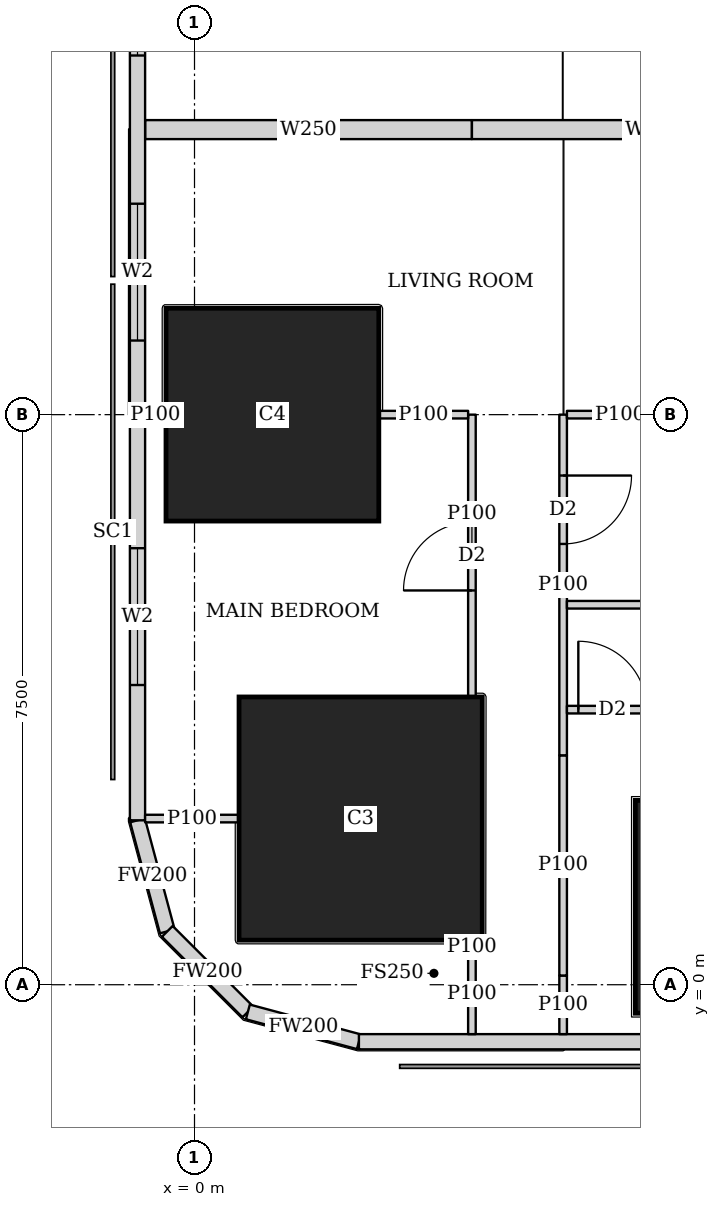
"""IFC4 building model, lengths in metres.
Left out: names, types, materials, properties, quantities, classifications, styles, units other than length and angle.
Written with IfcOpenShell. Run it as: python <this file> out.ifc"""

import sys

from ifc_helpers import new_model, si_unit, direction, frame, frame_2d, origin, origin_2d, place, context, subcontext, project, spatial, rectangle, extrude, element, fill, save


model = new_model("IFC4")
c1 = context("Model", 3, precision=1e-05, world=origin(), true_north=direction((0.0, 1.0)))
c2 = subcontext(c1, "Body", "Model", "MODEL_VIEW")
j1 = project(units=[si_unit("LENGTHUNIT", "METRE"), si_unit("PLANEANGLEUNIT", "RADIAN")], contexts=[c1])
p1 = place(None, origin())
s1 = spatial("IfcSite", under=j1, at=p1, CompositionType="ELEMENT")
p2 = place(p1, origin())
s2 = spatial("IfcBuilding", under=s1, at=p2, CompositionType="ELEMENT")
p3 = place(p2, frame((0.0, 0.0, 65.0)))
s3 = spatial("IfcBuildingStorey", under=s2, at=p3, CompositionType="ELEMENT", Elevation=65.0)
p4 = place(p3, frame((7.2, 1.025, 0.0), z_axis=(0.0, 0.0, 1.0), x_axis=(1.0, 0.0, 0.0)))
e1 = element("IfcColumn", 1, at=p4, inside=s3, PredefinedType="COLUMN", context=c2, shape_type="SweptSolid", body=[
    extrude(rectangle(XDim=2.8, YDim=2.8, at=origin_2d()), origin(), (0.0, 0.0, 1.0), 3.75),
])
p5 = place(p3, frame((2.186, 2.186, 0.0), z_axis=(0.0, 0.0, 1.0), x_axis=(1.0, 0.0, 0.0)))
e2 = element("IfcColumn", 2, at=p5, inside=s3, PredefinedType="COLUMN", context=c2, shape_type="SweptSolid", body=[
    extrude(rectangle(XDim=3.2, YDim=3.2, at=origin_2d()), origin(), (0.0, 0.0, 1.0), 3.75),
])
p6 = place(p3, frame((1.025, 7.5, 0.0), z_axis=(0.0, 0.0, 1.0), x_axis=(1.0, 0.0, 0.0)))
e3 = element("IfcColumn", 3, at=p6, inside=s3, PredefinedType="COLUMN", context=c2, shape_type="SweptSolid", body=[
    extrude(rectangle(XDim=2.8, YDim=2.8, at=origin_2d()), origin(), (0.0, 0.0, 1.0), 3.75),
])
p7 = place(p3, frame((2.163, -0.75, 0.0), z_axis=(0.0, 0.0, 1.0), x_axis=(1.0, 0.0, 0.0)))
e4 = element("IfcWall", 4, at=p7, inside=s3, PredefinedType="SOLIDWALL", context=c2, shape_type="SweptSolid", body=[
    extrude(rectangle(XDim=45.628, YDim=0.2, at=frame_2d((22.814, 0.0))), origin(), (0.0, 0.0, 1.0), 3.5),
])
p8 = place(p7, frame((9.537, 0.0, 0.9)))
e5 = element("IfcOpeningElement", 5, at=p8, cuts=e4, PredefinedType="OPENING", context=c2, shape_type="SweptSolid", body=[
    extrude(rectangle(XDim=1.8, YDim=1.5, at=frame_2d((0.9, 0.75))), frame((0.0, 0.11, 0.0), z_axis=(0.0, -1.0, 0.0), x_axis=(1.0, 0.0, 0.0)), (0.0, 0.0, 1.0), 0.22),
])
p9 = place(p7, frame((13.137, 0.0, 0.9)))
e6 = element("IfcOpeningElement", 6, at=p9, cuts=e4, PredefinedType="OPENING", context=c2, shape_type="SweptSolid", body=[
    extrude(rectangle(XDim=1.8, YDim=1.5, at=frame_2d((0.9, 0.75))), frame((0.0, 0.11, 0.0), z_axis=(0.0, -1.0, 0.0), x_axis=(1.0, 0.0, 0.0)), (0.0, 0.0, 1.0), 0.22),
])
p10 = place(p7, frame((16.737, 0.0, 0.9)))
e7 = element("IfcOpeningElement", 7, at=p10, cuts=e4, PredefinedType="OPENING", context=c2, shape_type="SweptSolid", body=[
    extrude(rectangle(XDim=1.8, YDim=1.5, at=frame_2d((0.9, 0.75))), frame((0.0, 0.11, 0.0), z_axis=(0.0, -1.0, 0.0), x_axis=(1.0, 0.0, 0.0)), (0.0, 0.0, 1.0), 0.22),
])
p11 = place(p7, frame((20.337, 0.0, 0.9)))
e8 = element("IfcOpeningElement", 8, at=p11, cuts=e4, PredefinedType="OPENING", context=c2, shape_type="SweptSolid", body=[
    extrude(rectangle(XDim=1.8, YDim=1.5, at=frame_2d((0.9, 0.75))), frame((0.0, 0.11, 0.0), z_axis=(0.0, -1.0, 0.0), x_axis=(1.0, 0.0, 0.0)), (0.0, 0.0, 1.0), 0.22),
])
p12 = place(p7, frame((23.937, 0.0, 0.9)))
e9 = element("IfcOpeningElement", 9, at=p12, cuts=e4, PredefinedType="OPENING", context=c2, shape_type="SweptSolid", body=[
    extrude(rectangle(XDim=1.8, YDim=1.5, at=frame_2d((0.9, 0.75))), frame((0.0, 0.11, 0.0), z_axis=(0.0, -1.0, 0.0), x_axis=(1.0, 0.0, 0.0)), (0.0, 0.0, 1.0), 0.22),
])
p13 = place(p7, frame((27.537, 0.0, 0.9)))
e10 = element("IfcOpeningElement", 10, at=p13, cuts=e4, PredefinedType="OPENING", context=c2, shape_type="SweptSolid", body=[
    extrude(rectangle(XDim=1.8, YDim=1.5, at=frame_2d((0.9, 0.75))), frame((0.0, 0.11, 0.0), z_axis=(0.0, -1.0, 0.0), x_axis=(1.0, 0.0, 0.0)), (0.0, 0.0, 1.0), 0.22),
])
p14 = place(p7, frame((31.137, 0.0, 0.9)))
e11 = element("IfcOpeningElement", 11, at=p14, cuts=e4, PredefinedType="OPENING", context=c2, shape_type="SweptSolid", body=[
    extrude(rectangle(XDim=1.8, YDim=1.5, at=frame_2d((0.9, 0.75))), frame((0.0, 0.11, 0.0), z_axis=(0.0, -1.0, 0.0), x_axis=(1.0, 0.0, 0.0)), (0.0, 0.0, 1.0), 0.22),
])
p15 = place(p7, frame((34.737, 0.0, 0.9)))
e12 = element("IfcOpeningElement", 12, at=p15, cuts=e4, PredefinedType="OPENING", context=c2, shape_type="SweptSolid", body=[
    extrude(rectangle(XDim=1.8, YDim=1.5, at=frame_2d((0.9, 0.75))), frame((0.0, 0.11, 0.0), z_axis=(0.0, -1.0, 0.0), x_axis=(1.0, 0.0, 0.0)), (0.0, 0.0, 1.0), 0.22),
])
p16 = place(p3, frame((-0.75, 42.837, 0.0), z_axis=(0.0, 0.0, 1.0), x_axis=(0.0, -1.0, 0.0)))
e13 = element("IfcWall", 13, at=p16, inside=s3, PredefinedType="SOLIDWALL", context=c2, shape_type="SweptSolid", body=[
    extrude(rectangle(XDim=40.674, YDim=0.2, at=frame_2d((20.337, 0.0))), origin(), (0.0, 0.0, 1.0), 3.5),
])
p17 = place(p16, frame((1.78, 0.0, 0.9)))
e14 = element("IfcOpeningElement", 14, at=p17, cuts=e13, PredefinedType="OPENING", context=c2, shape_type="SweptSolid", body=[
    extrude(rectangle(XDim=1.8, YDim=1.5, at=frame_2d((0.9, 0.75))), frame((0.0, 0.11, 0.0), z_axis=(0.0, -1.0, 0.0), x_axis=(1.0, 0.0, 0.0)), (0.0, 0.0, 1.0), 0.22),
])
p18 = place(p16, frame((6.312, 0.0, 0.9)))
e15 = element("IfcOpeningElement", 15, at=p18, cuts=e13, PredefinedType="OPENING", context=c2, shape_type="SweptSolid", body=[
    extrude(rectangle(XDim=1.8, YDim=1.5, at=frame_2d((0.9, 0.75))), frame((0.0, 0.11, 0.0), z_axis=(0.0, -1.0, 0.0), x_axis=(1.0, 0.0, 0.0)), (0.0, 0.0, 1.0), 0.22),
])
p19 = place(p16, frame((10.062, 0.0, 0.9)))
e16 = element("IfcOpeningElement", 16, at=p19, cuts=e13, PredefinedType="OPENING", context=c2, shape_type="SweptSolid", body=[
    extrude(rectangle(XDim=1.8, YDim=1.5, at=frame_2d((0.9, 0.75))), frame((0.0, 0.11, 0.0), z_axis=(0.0, -1.0, 0.0), x_axis=(1.0, 0.0, 0.0)), (0.0, 0.0, 1.0), 0.22),
])
p20 = place(p16, frame((13.812, 0.0, 0.9)))
e17 = element("IfcOpeningElement", 17, at=p20, cuts=e13, PredefinedType="OPENING", context=c2, shape_type="SweptSolid", body=[
    extrude(rectangle(XDim=1.8, YDim=1.5, at=frame_2d((0.9, 0.75))), frame((0.0, 0.11, 0.0), z_axis=(0.0, -1.0, 0.0), x_axis=(1.0, 0.0, 0.0)), (0.0, 0.0, 1.0), 0.22),
])
p21 = place(p16, frame((17.562, 0.0, 0.9)))
e18 = element("IfcOpeningElement", 18, at=p21, cuts=e13, PredefinedType="OPENING", context=c2, shape_type="SweptSolid", body=[
    extrude(rectangle(XDim=1.8, YDim=1.5, at=frame_2d((0.9, 0.75))), frame((0.0, 0.11, 0.0), z_axis=(0.0, -1.0, 0.0), x_axis=(1.0, 0.0, 0.0)), (0.0, 0.0, 1.0), 0.22),
])
p22 = place(p16, frame((21.312, 0.0, 0.9)))
e19 = element("IfcOpeningElement", 19, at=p22, cuts=e13, PredefinedType="OPENING", context=c2, shape_type="SweptSolid", body=[
    extrude(rectangle(XDim=1.8, YDim=1.5, at=frame_2d((0.9, 0.75))), frame((0.0, 0.11, 0.0), z_axis=(0.0, -1.0, 0.0), x_axis=(1.0, 0.0, 0.0)), (0.0, 0.0, 1.0), 0.22),
])
p23 = place(p16, frame((25.062, 0.0, 0.9)))
e20 = element("IfcOpeningElement", 20, at=p23, cuts=e13, PredefinedType="OPENING", context=c2, shape_type="SweptSolid", body=[
    extrude(rectangle(XDim=1.8, YDim=1.5, at=frame_2d((0.9, 0.75))), frame((0.0, 0.11, 0.0), z_axis=(0.0, -1.0, 0.0), x_axis=(1.0, 0.0, 0.0)), (0.0, 0.0, 1.0), 0.22),
])
p24 = place(p16, frame((28.812, 0.0, 0.9)))
e21 = element("IfcOpeningElement", 21, at=p24, cuts=e13, PredefinedType="OPENING", context=c2, shape_type="SweptSolid", body=[
    extrude(rectangle(XDim=1.8, YDim=1.5, at=frame_2d((0.9, 0.75))), frame((0.0, 0.11, 0.0), z_axis=(0.0, -1.0, 0.0), x_axis=(1.0, 0.0, 0.0)), (0.0, 0.0, 1.0), 0.22),
])
p25 = place(p16, frame((32.562, 0.0, 0.9)))
e22 = element("IfcOpeningElement", 22, at=p25, cuts=e13, PredefinedType="OPENING", context=c2, shape_type="SweptSolid", body=[
    extrude(rectangle(XDim=1.8, YDim=1.5, at=frame_2d((0.9, 0.75))), frame((0.0, 0.11, 0.0), z_axis=(0.0, -1.0, 0.0), x_axis=(1.0, 0.0, 0.0)), (0.0, 0.0, 1.0), 0.22),
])
p26 = place(p16, frame((37.094, 0.0, 0.9)))
e23 = element("IfcOpeningElement", 23, at=p26, cuts=e13, PredefinedType="OPENING", context=c2, shape_type="SweptSolid", body=[
    extrude(rectangle(XDim=1.8, YDim=1.5, at=frame_2d((0.9, 0.75))), frame((0.0, 0.11, 0.0), z_axis=(0.0, -1.0, 0.0), x_axis=(1.0, 0.0, 0.0)), (0.0, 0.0, 1.0), 0.22),
])
p27 = place(p3, frame((-0.75, 2.163, 0.0), z_axis=(0.0, 0.0, 1.0), x_axis=(0.259168954497, -0.965832000415, 0.0)))
e24 = element("IfcWall", 24, at=p27, inside=s3, PredefinedType="SOLIDWALL", context=c2, shape_type="SweptSolid", body=[
    extrude(rectangle(XDim=1.513, YDim=0.2, at=frame_2d((0.756, 0.0))), origin(), (0.0, 0.0, 1.0), 3.5),
])
p28 = place(p3, frame((-0.358, 0.702, 0.0), z_axis=(0.0, 0.0, 1.0), x_axis=(0.707106781187, -0.707106781187, 0.0)))
e25 = element("IfcWall", 25, at=p28, inside=s3, PredefinedType="SOLIDWALL", context=c2, shape_type="SweptSolid", body=[
    extrude(rectangle(XDim=1.499, YDim=0.2, at=frame_2d((0.75, 0.0))), origin(), (0.0, 0.0, 1.0), 3.5),
])
p29 = place(p3, frame((0.702, -0.358, 0.0), z_axis=(0.0, 0.0, 1.0), x_axis=(0.965832000415, -0.259168954497, 0.0)))
e26 = element("IfcWall", 26, at=p29, inside=s3, PredefinedType="SOLIDWALL", context=c2, shape_type="SweptSolid", body=[
    extrude(rectangle(XDim=1.513, YDim=0.2, at=frame_2d((0.756, 0.0))), origin(), (0.0, 0.0, 1.0), 3.5),
])
p30 = place(p3, frame((3.65, -0.65, 0.0), z_axis=(0.0, 0.0, 1.0), x_axis=(0.0, 1.0, 0.0)))
e27 = element("IfcWall", 27, at=p30, inside=s3, PredefinedType="PARTITIONING", context=c2, shape_type="SweptSolid", body=[
    extrude(rectangle(XDim=1.048, YDim=0.1, at=frame_2d((0.524, 0.0))), origin(), (0.0, 0.0, 1.0), 3.5),
])
p31 = place(p3, frame((3.65, 0.398, 0.0), z_axis=(0.0, 0.0, 1.0), x_axis=(0.0, 1.0, 0.0)))
e28 = element("IfcWall", 28, at=p31, inside=s3, PredefinedType="PARTITIONING", context=c2, shape_type="SweptSolid", body=[
    extrude(rectangle(XDim=0.187, YDim=0.1, at=frame_2d((0.094, 0.0))), origin(), (0.0, 0.0, 1.0), 2.05),
])
p32 = place(p3, frame((3.65, 3.787, 0.0), z_axis=(0.0, 0.0, 1.0), x_axis=(0.0, 1.0, 0.0)))
e29 = element("IfcWall", 29, at=p32, inside=s3, PredefinedType="PARTITIONING", context=c2, shape_type="SweptSolid", body=[
    extrude(rectangle(XDim=3.713, YDim=0.1, at=frame_2d((1.856, 0.0))), origin(), (0.0, 0.0, 1.0), 3.5),
])
p33 = place(p32, frame((1.4, 0.0, 0.0)))
e30 = element("IfcOpeningElement", 30, at=p33, cuts=e29, PredefinedType="OPENING", context=c2, shape_type="SweptSolid", body=[
    extrude(rectangle(XDim=0.9, YDim=2.1, at=frame_2d((0.45, 1.05))), frame((0.0, 0.06, 0.0), z_axis=(0.0, -1.0, 0.0), x_axis=(1.0, 0.0, 0.0)), (0.0, 0.0, 1.0), 0.12),
])
p34 = place(p3, frame((4.85, -0.65, 0.0), z_axis=(0.0, 0.0, 1.0), x_axis=(0.0, 1.0, 0.0)))
e31 = element("IfcWall", 31, at=p34, inside=s3, PredefinedType="PARTITIONING", context=c2, shape_type="SweptSolid", body=[
    extrude(rectangle(XDim=0.771, YDim=0.1, at=frame_2d((0.385, 0.0))), origin(), (0.0, 0.0, 1.0), 3.5),
])
p35 = place(p3, frame((4.85, 0.121, 0.0), z_axis=(0.0, 0.0, 1.0), x_axis=(0.0, 1.0, 0.0)))
e32 = element("IfcWall", 32, at=p35, inside=s3, PredefinedType="PARTITIONING", context=c2, shape_type="SweptSolid", body=[
    extrude(rectangle(XDim=2.897, YDim=0.1, at=frame_2d((1.448, 0.0))), origin(), (0.0, 0.0, 1.0), 2.05),
])
p36 = place(p3, frame((4.85, 3.018, 0.0), z_axis=(0.0, 0.0, 1.0), x_axis=(0.0, 1.0, 0.0)))
e33 = element("IfcWall", 33, at=p36, inside=s3, PredefinedType="PARTITIONING", context=c2, shape_type="SweptSolid", body=[
    extrude(rectangle(XDim=4.482, YDim=0.1, at=frame_2d((2.241, 0.0))), origin(), (0.0, 0.0, 1.0), 3.5),
])
p37 = place(p36, frame((2.781, 0.0, 0.0)))
e34 = element("IfcOpeningElement", 34, at=p37, cuts=e33, PredefinedType="OPENING", context=c2, shape_type="SweptSolid", body=[
    extrude(rectangle(XDim=0.9, YDim=2.1, at=frame_2d((0.45, 1.05))), frame((0.0, 0.06, 0.0), z_axis=(0.0, -1.0, 0.0), x_axis=(1.0, 0.0, 0.0)), (0.0, 0.0, 1.0), 0.12),
])
p38 = place(p3, frame((-0.65, 2.186, 0.0), z_axis=(0.0, 0.0, 1.0), x_axis=(1.0, 0.0, 0.0)))
e35 = element("IfcWall", 35, at=p38, inside=s3, PredefinedType="PARTITIONING", context=c2, shape_type="SweptSolid", body=[
    extrude(rectangle(XDim=1.235, YDim=0.1, at=frame_2d((0.617, 0.0))), origin(), (0.0, 0.0, 1.0), 3.5),
])
p39 = place(p3, frame((-0.65, 7.5, 0.0), z_axis=(0.0, 0.0, 1.0), x_axis=(1.0, 0.0, 0.0)))
e36 = element("IfcWall", 36, at=p39, inside=s3, PredefinedType="PARTITIONING", context=c2, shape_type="SweptSolid", body=[
    extrude(rectangle(XDim=0.274, YDim=0.1, at=frame_2d((0.137, 0.0))), origin(), (0.0, 0.0, 1.0), 3.5),
])
p40 = place(p3, frame((2.426, 7.5, 0.0), z_axis=(0.0, 0.0, 1.0), x_axis=(1.0, 0.0, 0.0)))
e37 = element("IfcWall", 37, at=p40, inside=s3, PredefinedType="PARTITIONING", context=c2, shape_type="SweptSolid", body=[
    extrude(rectangle(XDim=1.174, YDim=0.1, at=frame_2d((0.587, 0.0))), origin(), (0.0, 0.0, 1.0), 2.05),
])
p41 = place(p3, frame((4.9, 4.999, 0.0), z_axis=(0.0, 0.0, 1.0), x_axis=(1.0, 0.0, 0.0)))
e38 = element("IfcWall", 38, at=p41, inside=s3, PredefinedType="PARTITIONING", context=c2, shape_type="SweptSolid", body=[
    extrude(rectangle(XDim=3.525, YDim=0.1, at=frame_2d((1.763, 0.0))), origin(), (0.0, 0.0, 1.0), 3.5),
])
p42 = place(p41, frame((1.325, 0.0, 0.0)))
e39 = element("IfcOpeningElement", 39, at=p42, cuts=e38, PredefinedType="OPENING", context=c2, shape_type="SweptSolid", body=[
    extrude(rectangle(XDim=0.9, YDim=2.1, at=frame_2d((0.45, 1.05))), frame((0.0, 0.06, 0.0), z_axis=(0.0, -1.0, 0.0), x_axis=(1.0, 0.0, 0.0)), (0.0, 0.0, 1.0), 0.12),
])
p43 = place(p3, frame((4.9, 7.5, 0.0), z_axis=(0.0, 0.0, 1.0), x_axis=(1.0, 0.0, 0.0)))
e40 = element("IfcWall", 40, at=p43, inside=s3, PredefinedType="PARTITIONING", context=c2, shape_type="SweptSolid", body=[
    extrude(rectangle(XDim=1.399, YDim=0.1, at=frame_2d((0.7, 0.0))), origin(), (0.0, 0.0, 1.0), 3.5),
])
p44 = place(p3, frame((-0.65, 11.25, 0.0), z_axis=(0.0, 0.0, 1.0), x_axis=(1.0, 0.0, 0.0)))
e41 = element("IfcWall", 41, at=p44, inside=s3, PredefinedType="SOLIDWALL", context=c2, shape_type="SweptSolid", body=[
    extrude(rectangle(XDim=4.3, YDim=0.25, at=frame_2d((2.15, 0.0))), origin(), (0.0, 0.0, 1.0), 2.05),
])
p45 = place(p3, frame((3.65, 11.25, 0.0), z_axis=(0.0, 0.0, 1.0), x_axis=(1.0, 0.0, 0.0)))
e42 = element("IfcWall", 42, at=p45, inside=s3, PredefinedType="SOLIDWALL", context=c2, shape_type="SweptSolid", body=[
    extrude(rectangle(XDim=4.775, YDim=0.25, at=frame_2d((2.388, 0.0))), origin(), (0.0, 0.0, 1.0), 3.5),
])
p46 = place(p3, frame((4.9, 3.619, 0.0), z_axis=(0.0, 0.0, 1.0), x_axis=(1.0, 0.0, 0.0)))
e43 = element("IfcWall", 43, at=p46, inside=s3, PredefinedType="PARTITIONING", context=c2, shape_type="SweptSolid", body=[
    extrude(rectangle(XDim=3.525, YDim=0.1, at=frame_2d((1.763, 0.0))), origin(), (0.0, 0.0, 1.0), 3.5),
])
p47 = place(p46, frame((0.15, 0.0, 0.0)))
e44 = element("IfcOpeningElement", 44, at=p47, cuts=e43, PredefinedType="OPENING", context=c2, shape_type="SweptSolid", body=[
    extrude(rectangle(XDim=0.9, YDim=2.1, at=frame_2d((0.45, 1.05))), frame((0.0, 0.06, 0.0), z_axis=(0.0, -1.0, 0.0), x_axis=(1.0, 0.0, 0.0)), (0.0, 0.0, 1.0), 0.12),
])
p48 = place(p24, origin())
e45 = element("IfcWindow", 45, at=p48, inside=s3, PartitioningType="SINGLE_PANEL", PredefinedType="WINDOW", context=c2, shape_type="SweptSolid", body=[
    extrude(rectangle(XDim=1.8, YDim=1.5, at=frame_2d((0.9, 0.75))), frame((0.0, 0.03, 0.0), z_axis=(0.0, -1.0, 0.0), x_axis=(1.0, 0.0, 0.0)), (0.0, 0.0, 1.0), 0.06),
])
fill(e21, e45)
p49 = place(p25, origin())
e46 = element("IfcWindow", 46, at=p49, inside=s3, PartitioningType="SINGLE_PANEL", PredefinedType="WINDOW", context=c2, shape_type="SweptSolid", body=[
    extrude(rectangle(XDim=1.8, YDim=1.5, at=frame_2d((0.9, 0.75))), frame((0.0, 0.03, 0.0), z_axis=(0.0, -1.0, 0.0), x_axis=(1.0, 0.0, 0.0)), (0.0, 0.0, 1.0), 0.06),
])
fill(e22, e46)
p50 = place(p26, origin())
e47 = element("IfcWindow", 47, at=p50, inside=s3, PartitioningType="SINGLE_PANEL", PredefinedType="WINDOW", context=c2, shape_type="SweptSolid", body=[
    extrude(rectangle(XDim=1.8, YDim=1.5, at=frame_2d((0.9, 0.75))), frame((0.0, 0.03, 0.0), z_axis=(0.0, -1.0, 0.0), x_axis=(1.0, 0.0, 0.0)), (0.0, 0.0, 1.0), 0.06),
])
fill(e23, e47)
p51 = place(p33, origin())
e48 = element("IfcDoor", 48, at=p51, inside=s3, OperationType="SINGLE_SWING_LEFT", PredefinedType="DOOR", context=c2, shape_type="SweptSolid", body=[
    extrude(rectangle(XDim=0.9, YDim=2.1, at=frame_2d((0.45, 1.05))), frame((0.0, 0.025, 0.0), z_axis=(0.0, -1.0, 0.0), x_axis=(1.0, 0.0, 0.0)), (0.0, 0.0, 1.0), 0.05),
])
fill(e30, e48)
p52 = place(p37, origin())
e49 = element("IfcDoor", 49, at=p52, inside=s3, OperationType="SINGLE_SWING_LEFT", PredefinedType="DOOR", context=c2, shape_type="SweptSolid", body=[
    extrude(rectangle(XDim=0.9, YDim=2.1, at=frame_2d((0.45, 1.05))), frame((0.0, 0.025, 0.0), z_axis=(0.0, -1.0, 0.0), x_axis=(1.0, 0.0, 0.0)), (0.0, 0.0, 1.0), 0.05),
])
fill(e34, e49)
p53 = place(p47, origin())
e50 = element("IfcDoor", 50, at=p53, inside=s3, OperationType="SINGLE_SWING_LEFT", PredefinedType="DOOR", context=c2, shape_type="SweptSolid", body=[
    extrude(rectangle(XDim=0.9, YDim=2.1, at=frame_2d((0.45, 1.05))), frame((0.0, 0.025, 0.0), z_axis=(0.0, -1.0, 0.0), x_axis=(1.0, 0.0, 0.0)), (0.0, 0.0, 1.0), 0.05),
])
fill(e44, e50)
save(model, sys.argv[1])
